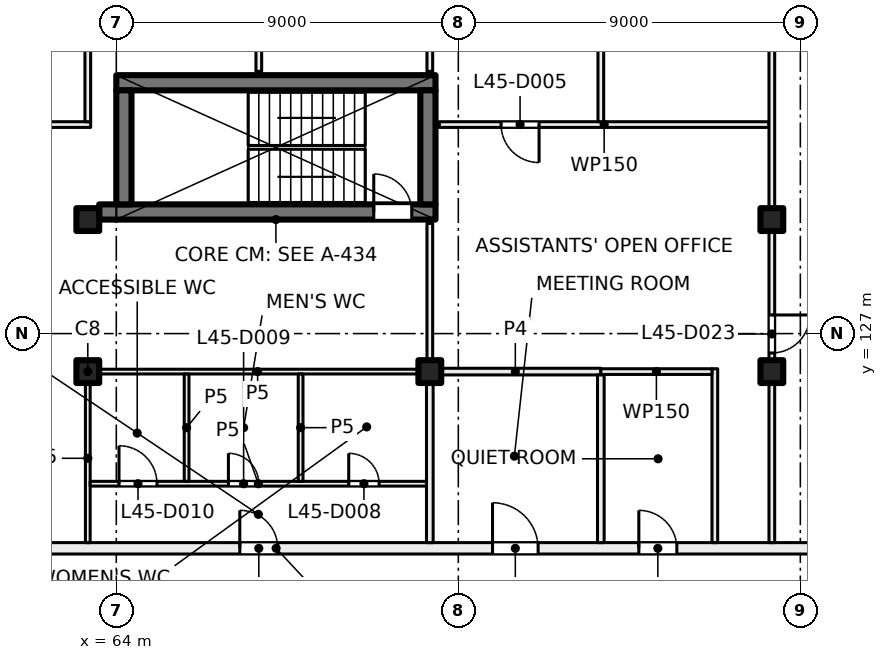
"""IFC4 building model, lengths in metres.
Left out: names, types, materials, properties, quantities, classifications, styles, units other than length and angle.
Written with IfcOpenShell. Run it as: python <this file> out.ifc"""

import sys

from ifc_helpers import new_model, si_unit, direction, frame, frame_2d, origin, origin_2d, place, context, subcontext, project, spatial, rectangle, extrude, element, fill, save


model = new_model("IFC4")
c1 = context("Model", 3, precision=1e-05, world=origin(), true_north=direction((0.0, 1.0)))
c2 = subcontext(c1, "Body", "Model", "MODEL_VIEW")
j1 = project(units=[si_unit("LENGTHUNIT", "METRE"), si_unit("PLANEANGLEUNIT", "RADIAN")], contexts=[c1])
p1 = place(None, origin())
s1 = spatial("IfcSite", under=j1, at=p1, CompositionType="ELEMENT")
p2 = place(p1, origin())
s2 = spatial("IfcBuilding", under=s1, at=p2, CompositionType="ELEMENT")
p3 = place(p2, frame((0.0, 0.0, 192.0)))
s3 = spatial("IfcBuildingStorey", under=s2, at=p3, CompositionType="ELEMENT", Elevation=192.0)
for number, where, z_axis, x_axis in (
    (1, (63.25, 130.0, 0.0), (0.0, 0.0, 1.0), (1.0, 0.0, 0.0)),
    (2, (81.25, 130.0, 0.0), (0.0, 0.0, 1.0), (1.0, 0.0, 0.0)),
    (3, (63.25, 126.0, 0.0), (0.0, 0.0, 1.0), (1.0, 0.0, 0.0)),
    (4, (72.25, 126.0, 0.0), (0.0, 0.0, 1.0), (1.0, 0.0, 0.0)),
    (5, (81.25, 126.0, 0.0), (0.0, 0.0, 1.0), (1.0, 0.0, 0.0)),
):
    element("IfcColumn", number, at=place(p3, frame(where, z_axis=z_axis, x_axis=x_axis)), inside=s3, PredefinedType="COLUMN", context=c2, shape_type="SweptSolid", body=[
        extrude(rectangle(XDim=0.6, YDim=0.6, at=origin_2d()), origin(), (0.0, 0.0, 1.0), 4.0),
    ])
p4 = place(p3, frame((63.55, 130.2, 0.0), z_axis=(0.0, 0.0, 1.0), x_axis=(1.0, 0.0, 0.0)))
e6 = element("IfcWall", 6, at=p4, inside=s3, PredefinedType="SHEAR", context=c2, shape_type="SweptSolid", body=[
    extrude(rectangle(XDim=8.85, YDim=0.4, at=frame_2d((4.425, 0.0))), origin(), (0.0, 0.0, 1.0), 4.0),
])
p5 = place(p4, frame((7.225, 0.0, 0.0)))
e7 = element("IfcOpeningElement", 7, at=p5, cuts=e6, PredefinedType="OPENING", context=c2, shape_type="SweptSolid", body=[
    extrude(rectangle(XDim=1.0, YDim=2.1, at=frame_2d((0.5, 1.05))), frame((0.0, 0.21, 0.0), z_axis=(0.0, -1.0, 0.0), x_axis=(1.0, 0.0, 0.0)), (0.0, 0.0, 1.0), 0.42),
])
p6 = place(p3, frame((64.0, 133.6, 0.0), z_axis=(0.0, 0.0, 1.0), x_axis=(1.0, 0.0, 0.0)))
e8 = element("IfcWall", 8, at=p6, inside=s3, PredefinedType="SHEAR", context=c2, shape_type="SweptSolid", body=[
    extrude(rectangle(XDim=8.4, YDim=0.4, at=frame_2d((4.2, 0.0))), origin(), (0.0, 0.0, 1.0), 4.0),
])
for number, where, z_axis, x_axis in (
    (9, (64.2, 130.4, 0.0), (0.0, 0.0, 1.0), (0.0, 1.0, 0.0)),
    (10, (72.2, 130.4, 0.0), (0.0, 0.0, 1.0), (0.0, 1.0, 0.0)),
):
    element("IfcWall", number, at=place(p3, frame(where, z_axis=z_axis, x_axis=x_axis)), inside=s3, PredefinedType="SHEAR", context=c2, shape_type="SweptSolid", body=[
        extrude(rectangle(XDim=3.0, YDim=0.4, at=frame_2d((1.5, 0.0))), origin(), (0.0, 0.0, 1.0), 4.0),
    ])
p7 = place(p3, frame((50.657, 121.35, 0.0), z_axis=(0.0, 0.0, 1.0), x_axis=(1.0, 0.0, 0.0)))
e11 = element("IfcWall", 11, at=p7, inside=s3, PredefinedType="PARTITIONING", context=c2, shape_type="SweptSolid", body=[
    extrude(rectangle(XDim=35.096, YDim=0.3, at=frame_2d((17.548, 0.0))), origin(), (0.0, 0.0, 1.0), 3.625),
])
p8 = place(p7, frame((27.093, 0.0, 0.0)))
e12 = element("IfcOpeningElement", 12, at=p8, cuts=e11, PredefinedType="OPENING", context=c2, shape_type="SweptSolid", body=[
    extrude(rectangle(XDim=1.0, YDim=2.1, at=frame_2d((0.5, 1.05))), frame((0.0, 0.16, 0.0), z_axis=(0.0, -1.0, 0.0), x_axis=(1.0, 0.0, 0.0)), (0.0, 0.0, 1.0), 0.32),
])
p9 = place(p7, frame((23.243, 0.0, 0.0)))
e13 = element("IfcOpeningElement", 13, at=p9, cuts=e11, PredefinedType="OPENING", context=c2, shape_type="SweptSolid", body=[
    extrude(rectangle(XDim=1.2, YDim=2.1, at=frame_2d((0.6, 1.05))), frame((0.0, 0.16, 0.0), z_axis=(0.0, -1.0, 0.0), x_axis=(1.0, 0.0, 0.0)), (0.0, 0.0, 1.0), 0.32),
])
p10 = place(p7, frame((31.943, 0.0, 0.0)))
e14 = element("IfcOpeningElement", 14, at=p10, cuts=e11, PredefinedType="OPENING", context=c2, shape_type="SweptSolid", body=[
    extrude(rectangle(XDim=1.8, YDim=2.1, at=frame_2d((0.9, 1.05))), frame((0.0, 0.16, 0.0), z_axis=(0.0, -1.0, 0.0), x_axis=(1.0, 0.0, 0.0)), (0.0, 0.0, 1.0), 0.32),
])
p11 = place(p7, frame((16.593, 0.0, 0.0)))
e15 = element("IfcOpeningElement", 15, at=p11, cuts=e11, PredefinedType="OPENING", context=c2, shape_type="SweptSolid", body=[
    extrude(rectangle(XDim=1.0, YDim=2.1, at=frame_2d((0.5, 1.05))), frame((0.0, 0.16, 0.0), z_axis=(0.0, -1.0, 0.0), x_axis=(1.0, 0.0, 0.0)), (0.0, 0.0, 1.0), 0.32),
])
p12 = place(p7, frame((7.193, 0.0, 0.0)))
e16 = element("IfcOpeningElement", 16, at=p12, cuts=e11, PredefinedType="OPENING", context=c2, shape_type="SweptSolid", body=[
    extrude(rectangle(XDim=1.8, YDim=2.1, at=frame_2d((0.9, 1.05))), frame((0.0, 0.16, 0.0), z_axis=(0.0, -1.0, 0.0), x_axis=(1.0, 0.0, 0.0)), (0.0, 0.0, 1.0), 0.32),
])
p13 = place(p7, frame((0.896, 0.0, 0.0)))
e17 = element("IfcOpeningElement", 17, at=p13, cuts=e11, PredefinedType="OPENING", context=c2, shape_type="SweptSolid", body=[
    extrude(rectangle(XDim=1.8, YDim=2.1, at=frame_2d((0.9, 1.05))), frame((0.0, 0.16, 0.0), z_axis=(0.0, -1.0, 0.0), x_axis=(1.0, 0.0, 0.0)), (0.0, 0.0, 1.0), 0.32),
])
p14 = place(p3, frame((63.325, 132.5, 0.0), z_axis=(0.0, 0.0, 1.0), x_axis=(-1.0, 0.0, 0.0)))
e18 = element("IfcWall", 18, at=p14, inside=s3, PredefinedType="PARTITIONING", context=c2, shape_type="SweptSolid", body=[
    extrude(rectangle(XDim=9.0, YDim=0.15, at=frame_2d((4.5, 0.0))), origin(), (0.0, 0.0, 1.0), 3.625),
])
p15 = place(p14, frame((6.298, 0.0, 0.0)))
e19 = element("IfcOpeningElement", 19, at=p15, cuts=e18, PredefinedType="OPENING", context=c2, shape_type="SweptSolid", body=[
    extrude(rectangle(XDim=1.0, YDim=2.1, at=frame_2d((0.5, 1.05))), frame((0.0, 0.085, 0.0), z_axis=(0.0, -1.0, 0.0), x_axis=(1.0, 0.0, 0.0)), (0.0, 0.0, 1.0), 0.17),
])
p16 = place(p3, frame((63.25, 121.5, 0.0), z_axis=(0.0, 0.0, 1.0), x_axis=(0.0, 1.0, 0.0)))
e20 = element("IfcWall", 20, at=p16, inside=s3, PredefinedType="PARTITIONING", context=c2, shape_type="SweptSolid", body=[
    extrude(rectangle(XDim=4.438, YDim=0.125, at=frame_2d((2.219, 0.0))), origin(), (0.0, 0.0, 1.0), 3.625),
])
p17 = place(p3, frame((63.312, 123.05, 0.0), z_axis=(0.0, 0.0, 1.0), x_axis=(1.0, 0.0, 0.0)))
e21 = element("IfcWall", 21, at=p17, inside=s3, PredefinedType="PARTITIONING", context=c2, shape_type="SweptSolid", body=[
    extrude(rectangle(XDim=8.85, YDim=0.125, at=frame_2d((4.425, 0.0))), origin(), (0.0, 0.0, 1.0), 3.625),
])
p18 = place(p17, frame((6.804, 0.0, 0.0)))
e22 = element("IfcOpeningElement", 22, at=p18, cuts=e21, PredefinedType="OPENING", context=c2, shape_type="SweptSolid", body=[
    extrude(rectangle(XDim=0.8, YDim=2.1, at=frame_2d((0.4, 1.05))), frame((0.0, 0.073, 0.0), z_axis=(0.0, -1.0, 0.0), x_axis=(1.0, 0.0, 0.0)), (0.0, 0.0, 1.0), 0.145),
])
p19 = place(p17, frame((3.638, 0.0, 0.0)))
e23 = element("IfcOpeningElement", 23, at=p19, cuts=e21, PredefinedType="OPENING", context=c2, shape_type="SweptSolid", body=[
    extrude(rectangle(XDim=0.8, YDim=2.1, at=frame_2d((0.4, 1.05))), frame((0.0, 0.073, 0.0), z_axis=(0.0, -1.0, 0.0), x_axis=(1.0, 0.0, 0.0)), (0.0, 0.0, 1.0), 0.145),
])
p20 = place(p17, frame((0.759, 0.0, 0.0)))
e24 = element("IfcOpeningElement", 24, at=p20, cuts=e21, PredefinedType="OPENING", context=c2, shape_type="SweptSolid", body=[
    extrude(rectangle(XDim=1.0, YDim=2.1, at=frame_2d((0.5, 1.05))), frame((0.0, 0.073, 0.0), z_axis=(0.0, -1.0, 0.0), x_axis=(1.0, 0.0, 0.0)), (0.0, 0.0, 1.0), 0.145),
])
p21 = place(p3, frame((63.188, 126.0, 0.0), z_axis=(0.0, 0.0, 1.0), x_axis=(1.0, 0.0, 0.0)))
e25 = element("IfcWall", 25, at=p21, inside=s3, PredefinedType="PARTITIONING", context=c2, shape_type="SweptSolid", body=[
    extrude(rectangle(XDim=9.062, YDim=0.125, at=frame_2d((4.531, 0.0))), origin(), (0.0, 0.0, 1.0), 3.625),
])
p22 = place(p3, frame((63.25, 138.4, 0.0), z_axis=(0.0, 0.0, 1.0), x_axis=(0.0, -1.0, 0.0)))
e26 = element("IfcWall", 26, at=p22, inside=s3, PredefinedType="PARTITIONING", context=c2, shape_type="SweptSolid", body=[
    extrude(rectangle(XDim=5.825, YDim=0.15, at=frame_2d((2.913, 0.0))), origin(), (0.0, 0.0, 1.0), 3.625),
])
p23 = place(p22, frame((2.423, 0.0, 0.0)))
e27 = element("IfcOpeningElement", 27, at=p23, cuts=e26, PredefinedType="OPENING", context=c2, shape_type="SweptSolid", body=[
    extrude(rectangle(XDim=1.0, YDim=2.1, at=frame_2d((0.5, 1.05))), frame((0.0, 0.085, 0.0), z_axis=(0.0, -1.0, 0.0), x_axis=(1.0, 0.0, 0.0)), (0.0, 0.0, 1.0), 0.17),
])
p24 = place(p3, frame((65.85, 125.938, 0.0), z_axis=(0.0, 0.0, 1.0), x_axis=(0.0, -1.0, 0.0)))
e28 = element("IfcWall", 28, at=p24, inside=s3, PredefinedType="PARTITIONING", context=c2, shape_type="SweptSolid", body=[
    extrude(rectangle(XDim=2.826, YDim=0.125, at=frame_2d((1.413, 0.0))), origin(), (0.0, 0.0, 1.0), 3.625),
])
p25 = place(p3, frame((67.75, 133.9, 0.0), z_axis=(0.0, 0.0, 1.0), x_axis=(0.0, 1.0, 0.0)))
e29 = element("IfcWall", 29, at=p25, inside=s3, PredefinedType="PARTITIONING", context=c2, shape_type="SweptSolid", body=[
    extrude(rectangle(XDim=4.5, YDim=0.15, at=frame_2d((2.25, 0.0))), origin(), (0.0, 0.0, 1.0), 3.625),
])
p26 = place(p25, frame((1.75, 0.0, 0.0)))
e30 = element("IfcOpeningElement", 30, at=p26, cuts=e29, PredefinedType="OPENING", context=c2, shape_type="SweptSolid", body=[
    extrude(rectangle(XDim=1.0, YDim=2.1, at=frame_2d((0.5, 1.05))), frame((0.0, 0.085, 0.0), z_axis=(0.0, -1.0, 0.0), x_axis=(1.0, 0.0, 0.0)), (0.0, 0.0, 1.0), 0.17),
])
p27 = place(p3, frame((68.85, 125.938, 0.0), z_axis=(0.0, 0.0, 1.0), x_axis=(0.0, -1.0, 0.0)))
e31 = element("IfcWall", 31, at=p27, inside=s3, PredefinedType="PARTITIONING", context=c2, shape_type="SweptSolid", body=[
    extrude(rectangle(XDim=2.826, YDim=0.125, at=frame_2d((1.413, 0.0))), origin(), (0.0, 0.0, 1.0), 3.625),
])
p28 = place(p3, frame((72.25, 121.5, 0.0), z_axis=(0.0, 0.0, 1.0), x_axis=(0.0, 1.0, 0.0)))
e32 = element("IfcWall", 32, at=p28, inside=s3, PredefinedType="PARTITIONING", context=c2, shape_type="SweptSolid", body=[
    extrude(rectangle(XDim=4.5, YDim=0.175, at=frame_2d((2.25, 0.0))), origin(), (0.0, 0.0, 1.0), 3.625),
])
p29 = place(p3, frame((72.25, 126.0, 0.0), z_axis=(0.0, 0.0, 1.0), x_axis=(0.0, 1.0, 0.0)))
e33 = element("IfcWall", 33, at=p29, inside=s3, PredefinedType="PARTITIONING", context=c2, shape_type="SweptSolid", body=[
    extrude(rectangle(XDim=3.9, YDim=0.15, at=frame_2d((1.95, 0.0))), origin(), (0.0, 0.0, 1.0), 3.625),
])
p30 = place(p3, frame((72.25, 126.0, 0.0), z_axis=(0.0, 0.0, 1.0), x_axis=(1.0, 0.0, 0.0)))
e34 = element("IfcWall", 34, at=p30, inside=s3, PredefinedType="PARTITIONING", context=c2, shape_type="SweptSolid", body=[
    extrude(rectangle(XDim=4.5, YDim=0.175, at=frame_2d((2.25, 0.0))), origin(), (0.0, 0.0, 1.0), 3.625),
])
p31 = place(p3, frame((72.25, 133.9, 0.0), z_axis=(0.0, 0.0, 1.0), x_axis=(0.0, 1.0, 0.0)))
e35 = element("IfcWall", 35, at=p31, inside=s3, PredefinedType="PARTITIONING", context=c2, shape_type="SweptSolid", body=[
    extrude(rectangle(XDim=4.5, YDim=0.15, at=frame_2d((2.25, 0.0))), origin(), (0.0, 0.0, 1.0), 3.625),
])
p32 = place(p3, frame((81.175, 132.5, 0.0), z_axis=(0.0, 0.0, 1.0), x_axis=(-1.0, 0.0, 0.0)))
e36 = element("IfcWall", 36, at=p32, inside=s3, PredefinedType="PARTITIONING", context=c2, shape_type="SweptSolid", body=[
    extrude(rectangle(XDim=8.675, YDim=0.15, at=frame_2d((4.337, 0.0))), origin(), (0.0, 0.0, 1.0), 3.625),
])
p33 = place(p32, frame((6.05, 0.0, 0.0)))
e37 = element("IfcOpeningElement", 37, at=p33, cuts=e36, PredefinedType="OPENING", context=c2, shape_type="SweptSolid", body=[
    extrude(rectangle(XDim=1.0, YDim=2.1, at=frame_2d((0.5, 1.05))), frame((0.0, 0.085, 0.0), z_axis=(0.0, -1.0, 0.0), x_axis=(1.0, 0.0, 0.0)), (0.0, 0.0, 1.0), 0.17),
])
p34 = place(p3, frame((76.75, 125.912, 0.0), z_axis=(0.0, 0.0, 1.0), x_axis=(0.0, -1.0, 0.0)))
e38 = element("IfcWall", 38, at=p34, inside=s3, PredefinedType="PARTITIONING", context=c2, shape_type="SweptSolid", body=[
    extrude(rectangle(XDim=4.412, YDim=0.175, at=frame_2d((2.206, 0.0))), origin(), (0.0, 0.0, 1.0), 3.625),
])
p35 = place(p3, frame((76.75, 132.575, 0.0), z_axis=(0.0, 0.0, 1.0), x_axis=(0.0, 1.0, 0.0)))
e39 = element("IfcWall", 39, at=p35, inside=s3, PredefinedType="PARTITIONING", context=c2, shape_type="SweptSolid", body=[
    extrude(rectangle(XDim=5.825, YDim=0.15, at=frame_2d((2.913, 0.0))), origin(), (0.0, 0.0, 1.0), 3.625),
])
p36 = place(p3, frame((79.75, 121.5, 0.0), z_axis=(0.0, 0.0, 1.0), x_axis=(0.0, 1.0, 0.0)))
e40 = element("IfcWall", 40, at=p36, inside=s3, PredefinedType="PARTITIONING", context=c2, shape_type="SweptSolid", body=[
    extrude(rectangle(XDim=4.575, YDim=0.15, at=frame_2d((2.288, 0.0))), origin(), (0.0, 0.0, 1.0), 3.625),
])
p37 = place(p3, frame((79.675, 126.0, 0.0), z_axis=(0.0, 0.0, 1.0), x_axis=(-1.0, 0.0, 0.0)))
e41 = element("IfcWall", 41, at=p37, inside=s3, PredefinedType="PARTITIONING", context=c2, shape_type="SweptSolid", body=[
    extrude(rectangle(XDim=2.925, YDim=0.15, at=frame_2d((1.462, 0.0))), origin(), (0.0, 0.0, 1.0), 3.625),
])
p38 = place(p3, frame((81.25, 138.4, 0.0), z_axis=(0.0, 0.0, 1.0), x_axis=(0.0, -1.0, 0.0)))
e42 = element("IfcWall", 42, at=p38, inside=s3, PredefinedType="PARTITIONING", context=c2, shape_type="SweptSolid", body=[
    extrude(rectangle(XDim=16.9, YDim=0.15, at=frame_2d((8.45, 0.0))), origin(), (0.0, 0.0, 1.0), 3.625),
])
p39 = place(p38, frame((2.45, 0.0, 0.0)))
e43 = element("IfcOpeningElement", 43, at=p39, cuts=e42, PredefinedType="OPENING", context=c2, shape_type="SweptSolid", body=[
    extrude(rectangle(XDim=1.0, YDim=2.1, at=frame_2d((0.5, 1.05))), frame((0.0, 0.085, 0.0), z_axis=(0.0, -1.0, 0.0), x_axis=(1.0, 0.0, 0.0)), (0.0, 0.0, 1.0), 0.17),
])
p40 = place(p38, frame((10.91, 0.0, 0.0)))
e44 = element("IfcOpeningElement", 44, at=p40, cuts=e42, PredefinedType="OPENING", context=c2, shape_type="SweptSolid", body=[
    extrude(rectangle(XDim=1.0, YDim=2.1, at=frame_2d((0.5, 1.05))), frame((0.0, 0.085, 0.0), z_axis=(0.0, -1.0, 0.0), x_axis=(1.0, 0.0, 0.0)), (0.0, 0.0, 1.0), 0.17),
])
p41 = place(p5, origin())
e45 = element("IfcDoor", 45, at=p41, inside=s3, OperationType="SINGLE_SWING_LEFT", PredefinedType="DOOR", context=c2, shape_type="SweptSolid", body=[
    extrude(rectangle(XDim=1.0, YDim=2.1, at=frame_2d((0.5, 1.05))), frame((0.0, 0.025, 0.0), z_axis=(0.0, -1.0, 0.0), x_axis=(1.0, 0.0, 0.0)), (0.0, 0.0, 1.0), 0.05),
])
fill(e7, e45)
p42 = place(p8, origin())
e46 = element("IfcDoor", 46, at=p42, inside=s3, OperationType="SINGLE_SWING_LEFT", PredefinedType="DOOR", context=c2, shape_type="SweptSolid", body=[
    extrude(rectangle(XDim=1.0, YDim=2.1, at=frame_2d((0.5, 1.05))), frame((0.0, 0.025, 0.0), z_axis=(0.0, -1.0, 0.0), x_axis=(1.0, 0.0, 0.0)), (0.0, 0.0, 1.0), 0.05),
])
fill(e12, e46)
p43 = place(p9, origin())
e47 = element("IfcDoor", 47, at=p43, inside=s3, OperationType="DOUBLE_DOOR_SINGLE_SWING", PredefinedType="DOOR", context=c2, shape_type="SweptSolid", body=[
    extrude(rectangle(XDim=1.2, YDim=2.1, at=frame_2d((0.6, 1.05))), frame((0.0, 0.025, 0.0), z_axis=(0.0, -1.0, 0.0), x_axis=(1.0, 0.0, 0.0)), (0.0, 0.0, 1.0), 0.05),
])
fill(e13, e47)
p44 = place(p33, origin())
e48 = element("IfcDoor", 48, at=p44, inside=s3, OperationType="SINGLE_SWING_RIGHT", PredefinedType="DOOR", context=c2, shape_type="SweptSolid", body=[
    extrude(rectangle(XDim=1.0, YDim=2.1, at=frame_2d((0.5, 1.05))), frame((0.0, 0.025, 0.0), z_axis=(0.0, -1.0, 0.0), x_axis=(1.0, 0.0, 0.0)), (0.0, 0.0, 1.0), 0.05),
])
fill(e37, e48)
p45 = place(p11, origin())
e49 = element("IfcDoor", 49, at=p45, inside=s3, OperationType="SINGLE_SWING_LEFT", PredefinedType="DOOR", context=c2, shape_type="SweptSolid", body=[
    extrude(rectangle(XDim=1.0, YDim=2.1, at=frame_2d((0.5, 1.05))), frame((0.0, 0.025, 0.0), z_axis=(0.0, -1.0, 0.0), x_axis=(1.0, 0.0, 0.0)), (0.0, 0.0, 1.0), 0.05),
])
fill(e15, e49)
p46 = place(p18, origin())
e50 = element("IfcDoor", 50, at=p46, inside=s3, OperationType="SINGLE_SWING_RIGHT", PredefinedType="DOOR", context=c2, shape_type="SweptSolid", body=[
    extrude(rectangle(XDim=0.8, YDim=2.1, at=frame_2d((0.4, 1.05))), frame((0.0, 0.025, 0.0), z_axis=(0.0, -1.0, 0.0), x_axis=(1.0, 0.0, 0.0)), (0.0, 0.0, 1.0), 0.05),
])
fill(e22, e50)
p47 = place(p19, origin())
e51 = element("IfcDoor", 51, at=p47, inside=s3, OperationType="SINGLE_SWING_LEFT", PredefinedType="DOOR", context=c2, shape_type="SweptSolid", body=[
    extrude(rectangle(XDim=0.8, YDim=2.1, at=frame_2d((0.4, 1.05))), frame((0.0, 0.025, 0.0), z_axis=(0.0, -1.0, 0.0), x_axis=(1.0, 0.0, 0.0)), (0.0, 0.0, 1.0), 0.05),
])
fill(e23, e51)
p48 = place(p20, origin())
e52 = element("IfcDoor", 52, at=p48, inside=s3, OperationType="SINGLE_SWING_LEFT", PredefinedType="DOOR", context=c2, shape_type="SweptSolid", body=[
    extrude(rectangle(XDim=1.0, YDim=2.1, at=frame_2d((0.5, 1.05))), frame((0.0, 0.025, 0.0), z_axis=(0.0, -1.0, 0.0), x_axis=(1.0, 0.0, 0.0)), (0.0, 0.0, 1.0), 0.05),
])
fill(e24, e52)
p49 = place(p40, origin())
e53 = element("IfcDoor", 53, at=p49, inside=s3, OperationType="SINGLE_SWING_RIGHT", PredefinedType="DOOR", context=c2, shape_type="SweptSolid", body=[
    extrude(rectangle(XDim=1.0, YDim=2.1, at=frame_2d((0.5, 1.05))), frame((0.0, 0.025, 0.0), z_axis=(0.0, -1.0, 0.0), x_axis=(1.0, 0.0, 0.0)), (0.0, 0.0, 1.0), 0.05),
])
fill(e44, e53)
save(model, sys.argv[1])
